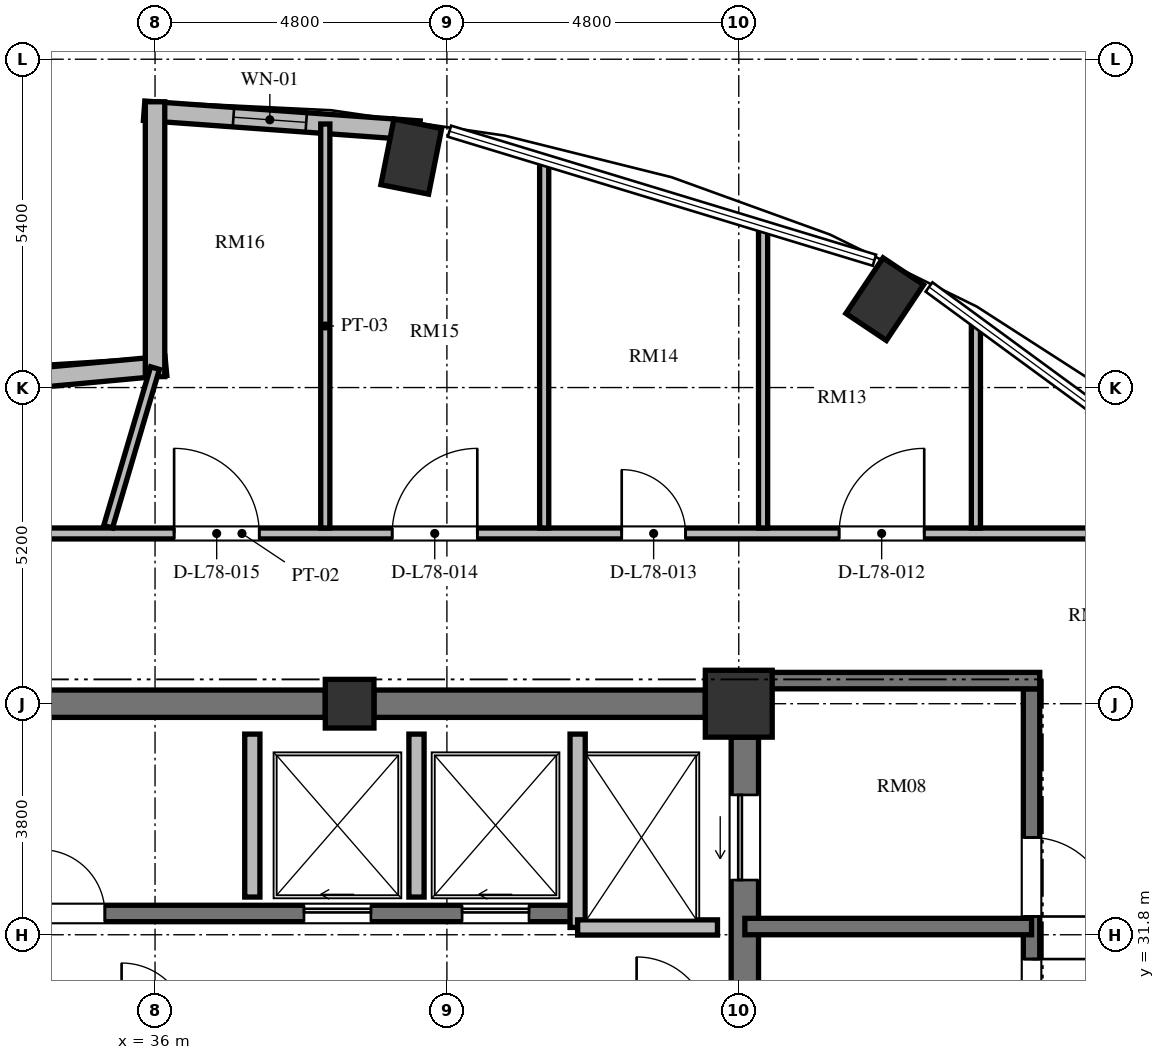
"""IFC4 building model, lengths in metres.
Left out: names, types, materials, properties, quantities, classifications, styles, units other than length and angle.
Written with IfcOpenShell. Run it as: python <this file> out.ifc"""

import sys

from ifc_helpers import new_model, si_unit, direction, frame, frame_2d, origin, origin_2d, place, context, subcontext, project, spatial, rectangle, extrude, element, fill, save


model = new_model("IFC4")
c1 = context("Model", 3, precision=1e-05, world=origin(), true_north=direction((0.0, 1.0)))
c2 = subcontext(c1, "Body", "Model", "MODEL_VIEW")
j1 = project(units=[si_unit("LENGTHUNIT", "METRE"), si_unit("PLANEANGLEUNIT", "RADIAN")], contexts=[c1])
p1 = place(None, origin())
s1 = spatial("IfcSite", under=j1, at=p1, CompositionType="ELEMENT")
p2 = place(p1, origin())
s2 = spatial("IfcBuilding", under=s1, at=p2, CompositionType="ELEMENT")
p3 = place(p2, frame((0.0, 0.0, 298.8)))
s3 = spatial("IfcBuildingStorey", under=s2, at=p3, CompositionType="ELEMENT", Elevation=298.8)
for number, where, z_axis, x_axis in (
    (1, (48.0, 42.254, 0.0), (0.0, 0.0, 1.0), (0.556, 0.831, 0.0)),
    (2, (40.214, 44.598, 0.0), (0.0, 0.0, 1.0), (0.195, 0.981, 0.0)),
):
    element("IfcColumn", number, at=place(p3, frame(where, z_axis=z_axis, x_axis=x_axis)), inside=s3, PredefinedType="COLUMN", context=c2, shape_type="SweptSolid", body=[
        extrude(rectangle(XDim=1.1, YDim=0.8, at=origin_2d()), origin(), (0.0, 0.0, 1.0), 3.648),
    ])
p4 = place(p3, frame((45.6, 35.6, 0.0), z_axis=(0.0, 0.0, 1.0), x_axis=(1.0, 0.0, 0.0)))
e3 = element("IfcColumn", 3, at=p4, inside=s3, PredefinedType="COLUMN", context=c2, shape_type="SweptSolid", body=[
    extrude(rectangle(XDim=1.1, YDim=1.1, at=origin_2d()), origin(), (0.0, 0.0, 1.0), 3.648),
])
p5 = place(p3, frame((39.2, 35.6, 0.0), z_axis=(0.0, 0.0, 1.0), x_axis=(1.0, 0.0, 0.0)))
e4 = element("IfcColumn", 4, at=p5, inside=s3, PredefinedType="COLUMN", context=c2, shape_type="SweptSolid", body=[
    extrude(rectangle(XDim=0.8, YDim=0.8, at=origin_2d()), origin(), (0.0, 0.0, 1.0), 3.648),
])
p6 = place(p3, frame((45.7, 20.95, 0.0), z_axis=(0.0, 0.0, 1.0), x_axis=(0.0, 1.0, 0.0)))
e5 = element("IfcWall", 5, at=p6, inside=s3, PredefinedType="SHEAR", context=c2, shape_type="SweptSolid", body=[
    extrude(rectangle(XDim=14.1, YDim=0.45, at=frame_2d((7.05, 0.0))), origin(), (0.0, 0.0, 1.0), 3.648),
])
p7 = place(p6, frame((11.75, 0.0, 0.0)))
e6 = element("IfcOpeningElement", 6, at=p7, cuts=e5, PredefinedType="OPENING", context=c2, shape_type="SweptSolid", body=[
    extrude(rectangle(XDim=1.4, YDim=2.3, at=frame_2d((0.7, 1.15))), frame((0.0, 0.235, 0.0), z_axis=(0.0, -1.0, 0.0), x_axis=(1.0, 0.0, 0.0)), (0.0, 0.0, 1.0), 0.47),
])
p8 = place(p6, frame((0.95, 0.0, 0.0)))
e7 = element("IfcOpeningElement", 7, at=p8, cuts=e5, PredefinedType="OPENING", context=c2, shape_type="SweptSolid", body=[
    extrude(rectangle(XDim=1.4, YDim=2.3, at=frame_2d((0.7, 1.15))), frame((0.0, 0.235, 0.0), z_axis=(0.0, -1.0, 0.0), x_axis=(1.0, 0.0, 0.0)), (0.0, 0.0, 1.0), 0.47),
])
p9 = place(p3, frame((33.2, 35.6, 0.0), z_axis=(0.0, 0.0, 1.0), x_axis=(1.0, 0.0, 0.0)))
e8 = element("IfcWall", 8, at=p9, inside=s3, PredefinedType="SHEAR", context=c2, shape_type="SweptSolid", body=[
    extrude(rectangle(XDim=5.6, YDim=0.45, at=frame_2d((2.8, 0.0))), origin(), (0.0, 0.0, 1.0), 3.648),
])
p10 = place(p3, frame((39.6, 35.6, 0.0), z_axis=(0.0, 0.0, 1.0), x_axis=(1.0, 0.0, 0.0)))
e9 = element("IfcWall", 9, at=p10, inside=s3, PredefinedType="SHEAR", context=c2, shape_type="SweptSolid", body=[
    extrude(rectangle(XDim=5.45, YDim=0.45, at=frame_2d((2.725, 0.0))), origin(), (0.0, 0.0, 1.0), 3.648),
])
p11 = place(p3, frame((40.35, 45.026, 0.0), z_axis=(0.0, 0.0, 1.0), x_axis=(-0.997412917451, 0.071885131294, 0.0)))
e10 = element("IfcWall", 10, at=p11, inside=s3, PredefinedType="SOLIDWALL", context=c2, shape_type="SweptSolid", body=[
    extrude(rectangle(XDim=4.541, YDim=0.32, at=frame_2d((2.271, 0.0))), origin(), (0.0, 0.0, 1.0), 3.328),
])
p12 = place(p11, frame((1.868, 0.0, 0.85)))
e11 = element("IfcOpeningElement", 11, at=p12, cuts=e10, PredefinedType="OPENING", context=c2, shape_type="SweptSolid", body=[
    extrude(rectangle(XDim=1.2, YDim=2.2, at=frame_2d((0.6, 1.1))), frame((0.0, 0.17, 0.0), z_axis=(0.0, -1.0, 0.0), x_axis=(1.0, 0.0, 0.0)), (0.0, 0.0, 1.0), 0.34),
])
p13 = place(p3, frame((36.179, 41.156, 0.0), z_axis=(0.0, 0.0, 1.0), x_axis=(-0.995736155144, -0.092247001792, 0.0)))
e12 = element("IfcWall", 12, at=p13, inside=s3, PredefinedType="SOLIDWALL", context=c2, shape_type="SweptSolid", body=[
    extrude(rectangle(XDim=3.216, YDim=0.32, at=frame_2d((1.608, 0.0))), origin(), (0.0, 0.0, 1.0), 2.413),
])
p14 = place(p3, frame((36.0, 45.5, 0.0), z_axis=(0.0, 0.0, 1.0), x_axis=(0.0, -1.0, 0.0)))
e13 = element("IfcWall", 13, at=p14, inside=s3, PredefinedType="SOLIDWALL", context=c2, shape_type="SweptSolid", body=[
    extrude(rectangle(XDim=4.52, YDim=0.32, at=frame_2d((2.26, 0.0))), origin(), (0.0, 0.0, 1.0), 3.328),
])
p15 = place(p3, frame((26.55, 32.15, 0.0), z_axis=(0.0, 0.0, 1.0), x_axis=(1.0, 0.0, 0.0)))
e14 = element("IfcWall", 14, at=p15, inside=s3, PredefinedType="SHEAR", context=c2, shape_type="SweptSolid", body=[
    extrude(rectangle(XDim=16.4, YDim=0.27, at=frame_2d((8.2, 0.0))), origin(), (0.0, 0.0, 1.0), 3.648),
])
p16 = place(p15, frame((2.175, 0.0, 0.0)))
e15 = element("IfcOpeningElement", 15, at=p16, cuts=e14, PredefinedType="OPENING", context=c2, shape_type="SweptSolid", body=[
    extrude(rectangle(XDim=1.05, YDim=2.15, at=frame_2d((0.525, 1.075))), frame((0.0, 0.145, 0.0), z_axis=(0.0, -1.0, 0.0), x_axis=(1.0, 0.0, 0.0)), (0.0, 0.0, 1.0), 0.29),
])
p17 = place(p15, frame((7.575, 0.0, 0.0)))
e16 = element("IfcOpeningElement", 16, at=p17, cuts=e14, PredefinedType="OPENING", context=c2, shape_type="SweptSolid", body=[
    extrude(rectangle(XDim=1.05, YDim=2.15, at=frame_2d((0.525, 1.075))), frame((0.0, 0.145, 0.0), z_axis=(0.0, -1.0, 0.0), x_axis=(1.0, 0.0, 0.0)), (0.0, 0.0, 1.0), 0.29),
])
p18 = place(p15, frame((11.9, 0.0, 0.0)))
e17 = element("IfcOpeningElement", 17, at=p18, cuts=e14, PredefinedType="OPENING", context=c2, shape_type="SweptSolid", body=[
    extrude(rectangle(XDim=1.1, YDim=2.2, at=frame_2d((0.55, 1.1))), frame((0.0, 0.145, 0.0), z_axis=(0.0, -1.0, 0.0), x_axis=(1.0, 0.0, 0.0)), (0.0, 0.0, 1.0), 0.29),
])
p19 = place(p15, frame((14.5, 0.0, 0.0)))
e18 = element("IfcOpeningElement", 18, at=p19, cuts=e14, PredefinedType="OPENING", context=c2, shape_type="SweptSolid", body=[
    extrude(rectangle(XDim=1.1, YDim=2.2, at=frame_2d((0.55, 1.1))), frame((0.0, 0.145, 0.0), z_axis=(0.0, -1.0, 0.0), x_axis=(1.0, 0.0, 0.0)), (0.0, 0.0, 1.0), 0.29),
])
p20 = place(p3, frame((42.95, 31.92, 0.0), z_axis=(0.0, 0.0, 1.0), x_axis=(0.0, 1.0, 0.0)))
e19 = element("IfcWall", 19, at=p20, inside=s3, PredefinedType="SOLIDWALL", context=c2, shape_type="SweptSolid", body=[
    extrude(rectangle(XDim=3.18, YDim=0.25, at=frame_2d((1.59, 0.0))), origin(), (0.0, 0.0, 1.0), 3.328),
])
p21 = place(p3, frame((42.95, 31.92, 0.0), z_axis=(0.0, 0.0, 1.0), x_axis=(1.0, 0.0, 0.0)))
e20 = element("IfcWall", 20, at=p21, inside=s3, PredefinedType="SOLIDWALL", context=c2, shape_type="SweptSolid", body=[
    extrude(rectangle(XDim=2.3, YDim=0.25, at=frame_2d((1.15, 0.0))), origin(), (0.0, 0.0, 1.0), 3.328),
])
for number, where, z_axis, x_axis in (
    (21, (37.6, 32.42, 0.0), (0.0, 0.0, 1.0), (0.0, 1.0, 0.0)),
    (22, (40.3, 32.42, 0.0), (0.0, 0.0, 1.0), (0.0, 1.0, 0.0)),
):
    element("IfcWall", number, at=place(p3, frame(where, z_axis=z_axis, x_axis=x_axis)), inside=s3, PredefinedType="SOLIDWALL", context=c2, shape_type="SweptSolid", body=[
        extrude(rectangle(XDim=2.68, YDim=0.25, at=frame_2d((1.34, 0.0))), origin(), (0.0, 0.0, 1.0), 3.328),
    ])
p22 = place(p3, frame((50.415, 35.845, 0.0), z_axis=(0.0, 0.0, 1.0), x_axis=(0.0, -1.0, 0.0)))
e23 = element("IfcWall", 23, at=p22, inside=s3, PredefinedType="SHEAR", context=c2, shape_type="SweptSolid", body=[
    extrude(rectangle(XDim=15.825, YDim=0.27, at=frame_2d((7.913, 0.0))), origin(), (0.0, 0.0, 1.0), 3.648),
])
p23 = place(p22, frame((4.445, 0.0, 0.0)))
e24 = element("IfcOpeningElement", 24, at=p23, cuts=e23, PredefinedType="OPENING", context=c2, shape_type="SweptSolid", body=[
    extrude(rectangle(XDim=1.2, YDim=2.15, at=frame_2d((0.6, 1.075))), frame((0.0, 0.145, 0.0), z_axis=(0.0, -1.0, 0.0), x_axis=(1.0, 0.0, 0.0)), (0.0, 0.0, 1.0), 0.29),
])
p24 = place(p22, frame((2.445, 0.0, 0.0)))
e25 = element("IfcOpeningElement", 25, at=p24, cuts=e23, PredefinedType="OPENING", context=c2, shape_type="SweptSolid", body=[
    extrude(rectangle(XDim=1.3, YDim=2.2, at=frame_2d((0.65, 1.1))), frame((0.0, 0.145, 0.0), z_axis=(0.0, -1.0, 0.0), x_axis=(1.0, 0.0, 0.0)), (0.0, 0.0, 1.0), 0.29),
])
p25 = place(p22, frame((13.095, 0.0, 0.0)))
e26 = element("IfcOpeningElement", 26, at=p25, cuts=e23, PredefinedType="OPENING", context=c2, shape_type="SweptSolid", body=[
    extrude(rectangle(XDim=1.3, YDim=2.2, at=frame_2d((0.65, 1.1))), frame((0.0, 0.145, 0.0), z_axis=(0.0, -1.0, 0.0), x_axis=(1.0, 0.0, 0.0)), (0.0, 0.0, 1.0), 0.29),
])
p26 = place(p3, frame((45.925, 35.98, 0.0), z_axis=(0.0, 0.0, 1.0), x_axis=(1.0, 0.0, 0.0)))
e27 = element("IfcWall", 27, at=p26, inside=s3, PredefinedType="SHEAR", context=c2, shape_type="SweptSolid", body=[
    extrude(rectangle(XDim=4.625, YDim=0.27, at=frame_2d((2.312, 0.0))), origin(), (0.0, 0.0, 1.0), 3.648),
])
p27 = place(p3, frame((45.7, 31.935, 0.0), z_axis=(0.0, 0.0, 1.0), x_axis=(1.0, 0.0, 0.0)))
e28 = element("IfcWall", 28, at=p27, inside=s3, PredefinedType="SHEAR", context=c2, shape_type="SweptSolid", body=[
    extrude(rectangle(XDim=4.715, YDim=0.27, at=frame_2d((2.357, 0.0))), origin(), (0.0, 0.0, 1.0), 3.648),
])
p28 = place(p3, frame((32.46, 38.4, 0.0), z_axis=(0.0, 0.0, 1.0), x_axis=(1.0, 0.0, 0.0)))
e29 = element("IfcWall", 29, at=p28, inside=s3, PredefinedType="PARTITIONING", context=c2, shape_type="SweptSolid", body=[
    extrude(rectangle(XDim=19.879, YDim=0.18, at=frame_2d((9.939, 0.0))), origin(), (0.0, 0.0, 1.0), 3.013),
])
p29 = place(p28, frame((14.79, 0.0, 0.0)))
e30 = element("IfcOpeningElement", 30, at=p29, cuts=e29, PredefinedType="OPENING", context=c2, shape_type="SweptSolid", body=[
    extrude(rectangle(XDim=1.4, YDim=2.2, at=frame_2d((0.7, 1.1))), frame((0.0, 0.1, 0.0), z_axis=(0.0, -1.0, 0.0), x_axis=(1.0, 0.0, 0.0)), (0.0, 0.0, 1.0), 0.2),
])
p30 = place(p28, frame((11.215, 0.0, 0.0)))
e31 = element("IfcOpeningElement", 31, at=p30, cuts=e29, PredefinedType="OPENING", context=c2, shape_type="SweptSolid", body=[
    extrude(rectangle(XDim=1.05, YDim=2.15, at=frame_2d((0.525, 1.075))), frame((0.0, 0.1, 0.0), z_axis=(0.0, -1.0, 0.0), x_axis=(1.0, 0.0, 0.0)), (0.0, 0.0, 1.0), 0.2),
])
p31 = place(p28, frame((7.44, 0.0, 0.0)))
e32 = element("IfcOpeningElement", 32, at=p31, cuts=e29, PredefinedType="OPENING", context=c2, shape_type="SweptSolid", body=[
    extrude(rectangle(XDim=1.4, YDim=2.2, at=frame_2d((0.7, 1.1))), frame((0.0, 0.1, 0.0), z_axis=(0.0, -1.0, 0.0), x_axis=(1.0, 0.0, 0.0)), (0.0, 0.0, 1.0), 0.2),
])
p32 = place(p28, frame((3.854, 0.0, 0.0)))
e33 = element("IfcOpeningElement", 33, at=p32, cuts=e29, PredefinedType="OPENING", context=c2, shape_type="SweptSolid", body=[
    extrude(rectangle(XDim=1.4, YDim=2.2, at=frame_2d((0.7, 1.1))), frame((0.0, 0.1, 0.0), z_axis=(0.0, -1.0, 0.0), x_axis=(1.0, 0.0, 0.0)), (0.0, 0.0, 1.0), 0.2),
])
p33 = place(p3, frame((35.229, 38.511, 0.0), z_axis=(0.0, 0.0, 1.0), x_axis=(0.28355057677, 0.958957282893, 0.0)))
e34 = element("IfcWall", 34, at=p33, inside=s3, PredefinedType="PARTITIONING", context=c2, shape_type="SweptSolid", body=[
    extrude(rectangle(XDim=2.721, YDim=0.15, at=frame_2d((1.36, 0.0))), origin(), (0.0, 0.0, 1.0), 3.328),
])
p34 = place(p3, frame((38.8, 38.49, 0.0), z_axis=(0.0, 0.0, 1.0), x_axis=(0.0, 1.0, 0.0)))
e35 = element("IfcWall", 35, at=p34, inside=s3, PredefinedType="PARTITIONING", context=c2, shape_type="SweptSolid", body=[
    extrude(rectangle(XDim=6.645, YDim=0.15, at=frame_2d((3.322, 0.0))), origin(), (0.0, 0.0, 1.0), 3.328),
])
p35 = place(p3, frame((42.4, 38.49, 0.0), z_axis=(0.0, 0.0, 1.0), x_axis=(0.0, 1.0, 0.0)))
e36 = element("IfcWall", 36, at=p35, inside=s3, PredefinedType="PARTITIONING", context=c2, shape_type="SweptSolid", body=[
    extrude(rectangle(XDim=6.036, YDim=0.15, at=frame_2d((3.018, 0.0))), origin(), (0.0, 0.0, 1.0), 3.328),
])
p36 = place(p3, frame((46.0, 38.49, 0.0), z_axis=(0.0, 0.0, 1.0), x_axis=(0.0, 1.0, 0.0)))
e37 = element("IfcWall", 37, at=p36, inside=s3, PredefinedType="PARTITIONING", context=c2, shape_type="SweptSolid", body=[
    extrude(rectangle(XDim=4.943, YDim=0.15, at=frame_2d((2.472, 0.0))), origin(), (0.0, 0.0, 1.0), 3.328),
])
p37 = place(p3, frame((49.5, 38.49, 0.0), z_axis=(0.0, 0.0, 1.0), x_axis=(0.0, 1.0, 0.0)))
e38 = element("IfcWall", 38, at=p37, inside=s3, PredefinedType="PARTITIONING", context=c2, shape_type="SweptSolid", body=[
    extrude(rectangle(XDim=3.387, YDim=0.15, at=frame_2d((1.694, 0.0))), origin(), (0.0, 0.0, 1.0), 3.328),
])
p38 = place(p12, origin())
e39 = element("IfcWindow", 39, at=p38, inside=s3, PartitioningType="SINGLE_PANEL", PredefinedType="WINDOW", context=c2, shape_type="SweptSolid", body=[
    extrude(rectangle(XDim=1.2, YDim=2.2, at=frame_2d((0.6, 1.1))), frame((0.0, 0.03, 0.0), z_axis=(0.0, -1.0, 0.0), x_axis=(1.0, 0.0, 0.0)), (0.0, 0.0, 1.0), 0.06),
])
fill(e11, e39)
p39 = place(p17, origin())
e40 = element("IfcDoor", 40, at=p39, inside=s3, OperationType="SINGLE_SWING_LEFT", PredefinedType="DOOR", context=c2, shape_type="SweptSolid", body=[
    extrude(rectangle(XDim=1.05, YDim=2.15, at=frame_2d((0.525, 1.075))), frame((0.0, 0.025, 0.0), z_axis=(0.0, -1.0, 0.0), x_axis=(1.0, 0.0, 0.0)), (0.0, 0.0, 1.0), 0.05),
])
fill(e16, e40)
p40 = place(p18, origin())
e41 = element("IfcDoor", 41, at=p40, inside=s3, OperationType="SLIDING_TO_LEFT", PredefinedType="DOOR", context=c2, shape_type="SweptSolid", body=[
    extrude(rectangle(XDim=1.1, YDim=2.2, at=frame_2d((0.55, 1.1))), frame((0.0, 0.025, 0.0), z_axis=(0.0, -1.0, 0.0), x_axis=(1.0, 0.0, 0.0)), (0.0, 0.0, 1.0), 0.05),
])
fill(e17, e41)
p41 = place(p19, origin())
e42 = element("IfcDoor", 42, at=p41, inside=s3, OperationType="SLIDING_TO_LEFT", PredefinedType="DOOR", context=c2, shape_type="SweptSolid", body=[
    extrude(rectangle(XDim=1.1, YDim=2.2, at=frame_2d((0.55, 1.1))), frame((0.0, 0.025, 0.0), z_axis=(0.0, -1.0, 0.0), x_axis=(1.0, 0.0, 0.0)), (0.0, 0.0, 1.0), 0.05),
])
fill(e18, e42)
p42 = place(p7, origin())
e43 = element("IfcDoor", 43, at=p42, inside=s3, OperationType="SLIDING_TO_LEFT", PredefinedType="DOOR", context=c2, shape_type="SweptSolid", body=[
    extrude(rectangle(XDim=1.4, YDim=2.3, at=frame_2d((0.7, 1.15))), frame((0.0, 0.025, 0.0), z_axis=(0.0, -1.0, 0.0), x_axis=(1.0, 0.0, 0.0)), (0.0, 0.0, 1.0), 0.05),
])
fill(e6, e43)
p43 = place(p23, origin())
e44 = element("IfcDoor", 44, at=p43, inside=s3, OperationType="SINGLE_SWING_LEFT", PredefinedType="DOOR", context=c2, shape_type="SweptSolid", body=[
    extrude(rectangle(XDim=1.2, YDim=2.15, at=frame_2d((0.6, 1.075))), frame((0.0, 0.025, 0.0), z_axis=(0.0, -1.0, 0.0), x_axis=(1.0, 0.0, 0.0)), (0.0, 0.0, 1.0), 0.05),
])
fill(e24, e44)
p44 = place(p24, origin())
e45 = element("IfcDoor", 45, at=p44, inside=s3, OperationType="SINGLE_SWING_RIGHT", PredefinedType="DOOR", context=c2, shape_type="SweptSolid", body=[
    extrude(rectangle(XDim=1.3, YDim=2.2, at=frame_2d((0.65, 1.1))), frame((0.0, 0.025, 0.0), z_axis=(0.0, -1.0, 0.0), x_axis=(1.0, 0.0, 0.0)), (0.0, 0.0, 1.0), 0.05),
])
fill(e25, e45)
p45 = place(p29, origin())
e46 = element("IfcDoor", 46, at=p45, inside=s3, OperationType="SINGLE_SWING_RIGHT", PredefinedType="DOOR", context=c2, shape_type="SweptSolid", body=[
    extrude(rectangle(XDim=1.4, YDim=2.2, at=frame_2d((0.7, 1.1))), frame((0.0, 0.025, 0.0), z_axis=(0.0, -1.0, 0.0), x_axis=(1.0, 0.0, 0.0)), (0.0, 0.0, 1.0), 0.05),
])
fill(e30, e46)
p46 = place(p30, origin())
e47 = element("IfcDoor", 47, at=p46, inside=s3, OperationType="SINGLE_SWING_LEFT", PredefinedType="DOOR", context=c2, shape_type="SweptSolid", body=[
    extrude(rectangle(XDim=1.05, YDim=2.15, at=frame_2d((0.525, 1.075))), frame((0.0, 0.025, 0.0), z_axis=(0.0, -1.0, 0.0), x_axis=(1.0, 0.0, 0.0)), (0.0, 0.0, 1.0), 0.05),
])
fill(e31, e47)
p47 = place(p31, origin())
e48 = element("IfcDoor", 48, at=p47, inside=s3, OperationType="SINGLE_SWING_RIGHT", PredefinedType="DOOR", context=c2, shape_type="SweptSolid", body=[
    extrude(rectangle(XDim=1.4, YDim=2.2, at=frame_2d((0.7, 1.1))), frame((0.0, 0.025, 0.0), z_axis=(0.0, -1.0, 0.0), x_axis=(1.0, 0.0, 0.0)), (0.0, 0.0, 1.0), 0.05),
])
fill(e32, e48)
p48 = place(p32, origin())
e49 = element("IfcDoor", 49, at=p48, inside=s3, OperationType="SINGLE_SWING_LEFT", PredefinedType="DOOR", context=c2, shape_type="SweptSolid", body=[
    extrude(rectangle(XDim=1.4, YDim=2.2, at=frame_2d((0.7, 1.1))), frame((0.0, 0.025, 0.0), z_axis=(0.0, -1.0, 0.0), x_axis=(1.0, 0.0, 0.0)), (0.0, 0.0, 1.0), 0.05),
])
fill(e33, e49)
save(model, sys.argv[1])
